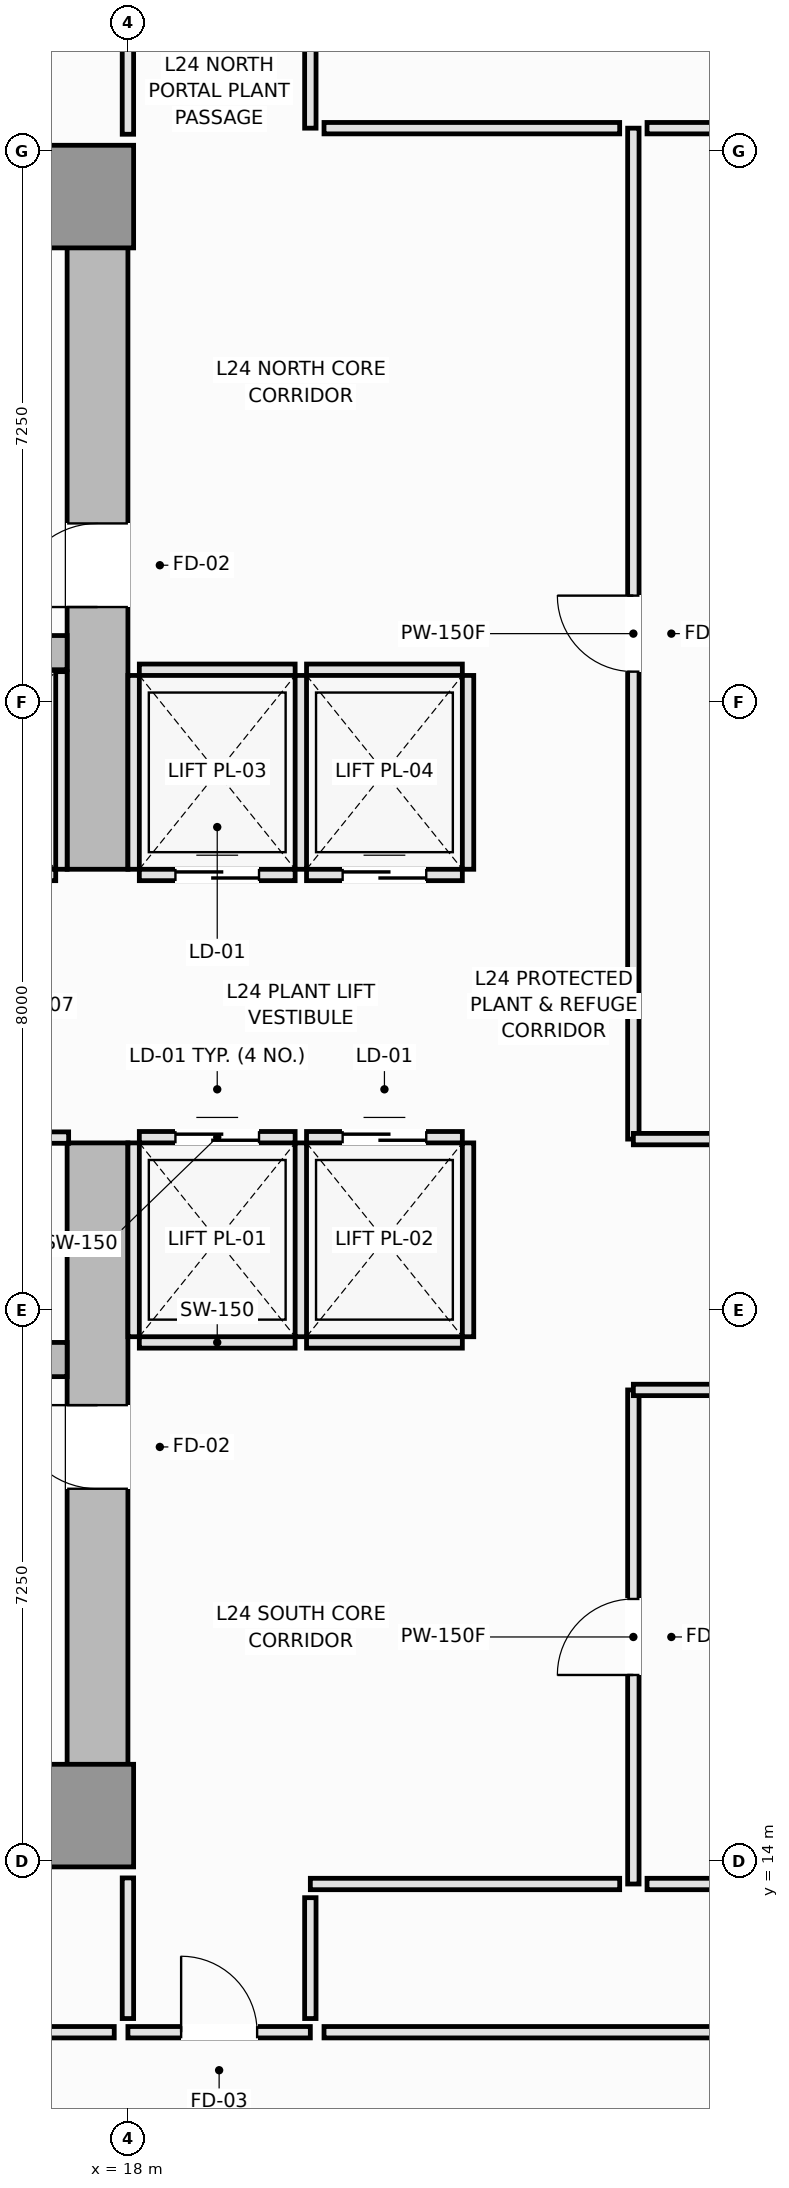
"""IFC4 building model, lengths in metres.
Left out: names, types, materials, properties, quantities, classifications, styles, units other than length and angle.
Written with IfcOpenShell. Run it as: python <this file> out.ifc"""

import sys

from ifc_helpers import new_model, si_unit, direction, frame, frame_2d, origin, origin_2d, place, context, subcontext, project, spatial, rectangle, extrude, element, fill, save


model = new_model("IFC4")
c1 = context("Model", 3, precision=1e-05, world=origin(), true_north=direction((0.0, 1.0)))
c2 = subcontext(c1, "Body", "Model", "MODEL_VIEW")
j1 = project(units=[si_unit("LENGTHUNIT", "METRE"), si_unit("PLANEANGLEUNIT", "RADIAN")], contexts=[c1])
p1 = place(None, origin())
s1 = spatial("IfcSite", under=j1, at=p1, CompositionType="ELEMENT")
p2 = place(p1, origin())
s2 = spatial("IfcBuilding", under=s1, at=p2, CompositionType="ELEMENT")
p3 = place(p2, frame((0.0, 0.0, 93.05)))
s3 = spatial("IfcBuildingStorey", under=s2, at=p3, CompositionType="ELEMENT", Elevation=93.05)
for number, where, z_axis, x_axis in (
    (1, (4.5, 14.4, 0.0), (0.0, 0.0, 1.0), (1.0, 0.0, 0.0)),
    (2, (4.5, 36.1, 0.0), (0.0, 0.0, 1.0), (1.0, 0.0, 0.0)),
):
    element("IfcWall", number, at=place(p3, frame(where, z_axis=z_axis, x_axis=x_axis)), inside=s3, PredefinedType="SHEAR", context=c2, shape_type="SweptSolid", body=[
        extrude(rectangle(XDim=13.5, YDim=0.8, at=frame_2d((6.75, 0.0))), origin(), (0.0, 0.0, 1.0), 4.8),
    ])
p4 = place(p3, frame((17.6, 14.8, 0.0), z_axis=(0.0, 0.0, 1.0), x_axis=(0.0, 1.0, 0.0)))
e3 = element("IfcWall", 3, at=p4, inside=s3, PredefinedType="SHEAR", context=c2, shape_type="SweptSolid", body=[
    extrude(rectangle(XDim=8.65, YDim=0.8, at=frame_2d((4.325, 0.0))), origin(), (0.0, 0.0, 1.0), 4.8),
])
p5 = place(p4, frame((4.1, 0.0, 0.0)))
e4 = element("IfcOpeningElement", 4, at=p5, cuts=e3, PredefinedType="OPENING", context=c2, shape_type="SweptSolid", body=[
    extrude(rectangle(XDim=1.1, YDim=2.15, at=frame_2d((0.55, 1.075))), frame((0.0, 0.41, 0.0), z_axis=(0.0, -1.0, 0.0), x_axis=(1.0, 0.0, 0.0)), (0.0, 0.0, 1.0), 0.82),
])
p6 = place(p3, frame((17.6, 27.05, 0.0), z_axis=(0.0, 0.0, 1.0), x_axis=(0.0, 1.0, 0.0)))
e5 = element("IfcWall", 5, at=p6, inside=s3, PredefinedType="SHEAR", context=c2, shape_type="SweptSolid", body=[
    extrude(rectangle(XDim=8.65, YDim=0.8, at=frame_2d((4.325, 0.0))), origin(), (0.0, 0.0, 1.0), 4.8),
])
p7 = place(p6, frame((3.45, 0.0, 0.0)))
e6 = element("IfcOpeningElement", 6, at=p7, cuts=e5, PredefinedType="OPENING", context=c2, shape_type="SweptSolid", body=[
    extrude(rectangle(XDim=1.1, YDim=2.15, at=frame_2d((0.55, 1.075))), frame((0.0, 0.41, 0.0), z_axis=(0.0, -1.0, 0.0), x_axis=(1.0, 0.0, 0.0)), (0.0, 0.0, 1.0), 0.82),
])
for number, where, z_axis, x_axis in (
    (7, (5.3, 20.6, 0.0), (0.0, 0.0, 1.0), (1.0, 0.0, 0.0)),
    (8, (5.3, 29.9, 0.0), (0.0, 0.0, 1.0), (1.0, 0.0, 0.0)),
):
    element("IfcWall", number, at=place(p3, frame(where, z_axis=z_axis, x_axis=x_axis)), inside=s3, PredefinedType="SHEAR", context=c2, shape_type="SweptSolid", body=[
        extrude(rectangle(XDim=11.9, YDim=0.45, at=frame_2d((5.95, 0.0))), origin(), (0.0, 0.0, 1.0), 4.8),
    ])
for number, where, z_axis, x_axis in (
    (9, (17.4, 14.6, 0.0), (0.0, 0.0, 1.0), (1.0, 0.0, 0.0)),
    (10, (17.4, 35.9, 0.0), (0.0, 0.0, 1.0), (1.0, 0.0, 0.0)),
):
    element("IfcColumn", number, at=place(p3, frame(where, z_axis=z_axis, x_axis=x_axis)), inside=s3, PredefinedType="PILASTER", context=c2, shape_type="SweptSolid", body=[
        extrude(rectangle(XDim=1.35, YDim=1.35, at=origin_2d()), origin(), (0.0, 0.0, 1.0), 4.8),
    ])
p8 = place(p3, frame((18.15, 20.825, 0.0), z_axis=(0.0, 0.0, 1.0), x_axis=(1.0, 0.0, 0.0)))
e11 = element("IfcWall", 11, at=p8, inside=s3, PredefinedType="PARTITIONING", context=c2, shape_type="SweptSolid", body=[
    extrude(rectangle(XDim=2.05, YDim=0.15, at=frame_2d((1.025, 0.0))), origin(), (0.0, 0.0, 1.0), 4.62),
])
p9 = place(p3, frame((18.15, 23.525, 0.0), z_axis=(0.0, 0.0, 1.0), x_axis=(1.0, 0.0, 0.0)))
e12 = element("IfcWall", 12, at=p9, inside=s3, PredefinedType="PARTITIONING", context=c2, shape_type="SweptSolid", body=[
    extrude(rectangle(XDim=2.05, YDim=0.15, at=frame_2d((1.025, 0.0))), origin(), (0.0, 0.0, 1.0), 4.62),
])
p10 = place(p9, frame((0.475, 0.0, 0.0)))
e13 = element("IfcOpeningElement", 13, at=p10, cuts=e12, PredefinedType="OPENING", context=c2, shape_type="SweptSolid", body=[
    extrude(rectangle(XDim=1.1, YDim=2.2, at=frame_2d((0.55, 1.1))), frame((0.0, 0.085, 0.0), z_axis=(0.0, -1.0, 0.0), x_axis=(1.0, 0.0, 0.0)), (0.0, 0.0, 1.0), 0.17),
])
for number, where, z_axis, x_axis in (
    (14, (18.075, 20.9, 0.0), (0.0, 0.0, 1.0), (0.0, 1.0, 0.0)),
    (15, (20.275, 20.9, 0.0), (0.0, 0.0, 1.0), (0.0, 1.0, 0.0)),
):
    element("IfcWall", number, at=place(p3, frame(where, z_axis=z_axis, x_axis=x_axis)), inside=s3, PredefinedType="PARTITIONING", context=c2, shape_type="SweptSolid", body=[
        extrude(rectangle(XDim=2.55, YDim=0.15, at=frame_2d((1.275, 0.0))), origin(), (0.0, 0.0, 1.0), 4.62),
    ])
p11 = place(p3, frame((20.35, 20.825, 0.0), z_axis=(0.0, 0.0, 1.0), x_axis=(1.0, 0.0, 0.0)))
e16 = element("IfcWall", 16, at=p11, inside=s3, PredefinedType="PARTITIONING", context=c2, shape_type="SweptSolid", body=[
    extrude(rectangle(XDim=2.05, YDim=0.15, at=frame_2d((1.025, 0.0))), origin(), (0.0, 0.0, 1.0), 4.62),
])
p12 = place(p3, frame((20.35, 23.525, 0.0), z_axis=(0.0, 0.0, 1.0), x_axis=(1.0, 0.0, 0.0)))
e17 = element("IfcWall", 17, at=p12, inside=s3, PredefinedType="PARTITIONING", context=c2, shape_type="SweptSolid", body=[
    extrude(rectangle(XDim=2.05, YDim=0.15, at=frame_2d((1.025, 0.0))), origin(), (0.0, 0.0, 1.0), 4.62),
])
p13 = place(p12, frame((0.475, 0.0, 0.0)))
e18 = element("IfcOpeningElement", 18, at=p13, cuts=e17, PredefinedType="OPENING", context=c2, shape_type="SweptSolid", body=[
    extrude(rectangle(XDim=1.1, YDim=2.2, at=frame_2d((0.55, 1.1))), frame((0.0, 0.085, 0.0), z_axis=(0.0, -1.0, 0.0), x_axis=(1.0, 0.0, 0.0)), (0.0, 0.0, 1.0), 0.17),
])
p14 = place(p3, frame((22.475, 20.9, 0.0), z_axis=(0.0, 0.0, 1.0), x_axis=(0.0, 1.0, 0.0)))
e19 = element("IfcWall", 19, at=p14, inside=s3, PredefinedType="PARTITIONING", context=c2, shape_type="SweptSolid", body=[
    extrude(rectangle(XDim=2.55, YDim=0.15, at=frame_2d((1.275, 0.0))), origin(), (0.0, 0.0, 1.0), 4.62),
])
p15 = place(p3, frame((18.15, 26.975, 0.0), z_axis=(0.0, 0.0, 1.0), x_axis=(1.0, 0.0, 0.0)))
e20 = element("IfcWall", 20, at=p15, inside=s3, PredefinedType="PARTITIONING", context=c2, shape_type="SweptSolid", body=[
    extrude(rectangle(XDim=2.05, YDim=0.15, at=frame_2d((1.025, 0.0))), origin(), (0.0, 0.0, 1.0), 4.62),
])
p16 = place(p15, frame((0.475, 0.0, 0.0)))
e21 = element("IfcOpeningElement", 21, at=p16, cuts=e20, PredefinedType="OPENING", context=c2, shape_type="SweptSolid", body=[
    extrude(rectangle(XDim=1.1, YDim=2.2, at=frame_2d((0.55, 1.1))), frame((0.0, 0.085, 0.0), z_axis=(0.0, -1.0, 0.0), x_axis=(1.0, 0.0, 0.0)), (0.0, 0.0, 1.0), 0.17),
])
p17 = place(p3, frame((18.15, 29.675, 0.0), z_axis=(0.0, 0.0, 1.0), x_axis=(1.0, 0.0, 0.0)))
e22 = element("IfcWall", 22, at=p17, inside=s3, PredefinedType="PARTITIONING", context=c2, shape_type="SweptSolid", body=[
    extrude(rectangle(XDim=2.05, YDim=0.15, at=frame_2d((1.025, 0.0))), origin(), (0.0, 0.0, 1.0), 4.62),
])
for number, where, z_axis, x_axis in (
    (23, (18.075, 27.05, 0.0), (0.0, 0.0, 1.0), (0.0, 1.0, 0.0)),
    (24, (20.275, 27.05, 0.0), (0.0, 0.0, 1.0), (0.0, 1.0, 0.0)),
):
    element("IfcWall", number, at=place(p3, frame(where, z_axis=z_axis, x_axis=x_axis)), inside=s3, PredefinedType="PARTITIONING", context=c2, shape_type="SweptSolid", body=[
        extrude(rectangle(XDim=2.55, YDim=0.15, at=frame_2d((1.275, 0.0))), origin(), (0.0, 0.0, 1.0), 4.62),
    ])
p18 = place(p3, frame((20.35, 26.975, 0.0), z_axis=(0.0, 0.0, 1.0), x_axis=(1.0, 0.0, 0.0)))
e25 = element("IfcWall", 25, at=p18, inside=s3, PredefinedType="PARTITIONING", context=c2, shape_type="SweptSolid", body=[
    extrude(rectangle(XDim=2.05, YDim=0.15, at=frame_2d((1.025, 0.0))), origin(), (0.0, 0.0, 1.0), 4.62),
])
p19 = place(p18, frame((0.475, 0.0, 0.0)))
e26 = element("IfcOpeningElement", 26, at=p19, cuts=e25, PredefinedType="OPENING", context=c2, shape_type="SweptSolid", body=[
    extrude(rectangle(XDim=1.1, YDim=2.2, at=frame_2d((0.55, 1.1))), frame((0.0, 0.085, 0.0), z_axis=(0.0, -1.0, 0.0), x_axis=(1.0, 0.0, 0.0)), (0.0, 0.0, 1.0), 0.17),
])
p20 = place(p3, frame((20.35, 29.675, 0.0), z_axis=(0.0, 0.0, 1.0), x_axis=(1.0, 0.0, 0.0)))
e27 = element("IfcWall", 27, at=p20, inside=s3, PredefinedType="PARTITIONING", context=c2, shape_type="SweptSolid", body=[
    extrude(rectangle(XDim=2.05, YDim=0.15, at=frame_2d((1.025, 0.0))), origin(), (0.0, 0.0, 1.0), 4.62),
])
p21 = place(p3, frame((22.475, 27.05, 0.0), z_axis=(0.0, 0.0, 1.0), x_axis=(0.0, 1.0, 0.0)))
e28 = element("IfcWall", 28, at=p21, inside=s3, PredefinedType="PARTITIONING", context=c2, shape_type="SweptSolid", body=[
    extrude(rectangle(XDim=2.55, YDim=0.15, at=frame_2d((1.275, 0.0))), origin(), (0.0, 0.0, 1.0), 4.62),
])
p22 = place(p3, frame((14.5, 26.975, 0.0), z_axis=(0.0, 0.0, 1.0), x_axis=(1.0, 0.0, 0.0)))
e29 = element("IfcWall", 29, at=p22, inside=s3, PredefinedType="PARTITIONING", context=c2, shape_type="SweptSolid", body=[
    extrude(rectangle(XDim=2.55, YDim=0.15, at=frame_2d((1.275, 0.0))), origin(), (0.0, 0.0, 1.0), 4.62),
])
p23 = place(p22, frame((0.625, 0.0, 0.0)))
e30 = element("IfcOpeningElement", 30, at=p23, cuts=e29, PredefinedType="OPENING", context=c2, shape_type="SweptSolid", body=[
    extrude(rectangle(XDim=1.3, YDim=2.2, at=frame_2d((0.65, 1.1))), frame((0.0, 0.085, 0.0), z_axis=(0.0, -1.0, 0.0), x_axis=(1.0, 0.0, 0.0)), (0.0, 0.0, 1.0), 0.17),
])
p24 = place(p3, frame((17.125, 27.05, 0.0), z_axis=(0.0, 0.0, 1.0), x_axis=(0.0, 1.0, 0.0)))
e31 = element("IfcWall", 31, at=p24, inside=s3, PredefinedType="PARTITIONING", context=c2, shape_type="SweptSolid", body=[
    extrude(rectangle(XDim=2.6, YDim=0.15, at=frame_2d((1.3, 0.0))), origin(), (0.0, 0.0, 1.0), 4.62),
])
p25 = place(p3, frame((14.33, 23.52, 0.0), z_axis=(0.0, 0.0, 1.0), x_axis=(1.0, 0.0, 0.0)))
e32 = element("IfcWall", 32, at=p25, inside=s3, PredefinedType="PARTITIONING", context=c2, shape_type="SweptSolid", body=[
    extrude(rectangle(XDim=2.89, YDim=0.15, at=frame_2d((1.445, 0.0))), origin(), (0.0, 0.0, 1.0), 4.62),
])
p26 = place(p25, frame((0.28, 0.0, 0.0)))
e33 = element("IfcOpeningElement", 33, at=p26, cuts=e32, PredefinedType="OPENING", context=c2, shape_type="SweptSolid", body=[
    extrude(rectangle(XDim=0.9, YDim=2.1, at=frame_2d((0.45, 1.05))), frame((0.0, 0.085, 0.0), z_axis=(0.0, -1.0, 0.0), x_axis=(1.0, 0.0, 0.0)), (0.0, 0.0, 1.0), 0.17),
])
p27 = place(p25, frame((1.71, 0.0, 0.0)))
e34 = element("IfcOpeningElement", 34, at=p27, cuts=e32, PredefinedType="OPENING", context=c2, shape_type="SweptSolid", body=[
    extrude(rectangle(XDim=0.9, YDim=2.1, at=frame_2d((0.45, 1.05))), frame((0.0, 0.085, 0.0), z_axis=(0.0, -1.0, 0.0), x_axis=(1.0, 0.0, 0.0)), (0.0, 0.0, 1.0), 0.17),
])
p28 = place(p3, frame((24.65, 13.7, 0.0), z_axis=(0.0, 0.0, 1.0), x_axis=(0.0, 1.0, 0.0)))
e35 = element("IfcWall", 35, at=p28, inside=s3, PredefinedType="PARTITIONING", context=c2, shape_type="SweptSolid", body=[
    extrude(rectangle(XDim=6.5, YDim=0.15, at=frame_2d((3.25, 0.0))), origin(), (0.0, 0.0, 1.0), 4.62),
])
p29 = place(p28, frame((2.75, 0.0, 0.0)))
e36 = element("IfcOpeningElement", 36, at=p29, cuts=e35, PredefinedType="OPENING", context=c2, shape_type="SweptSolid", body=[
    extrude(rectangle(XDim=1.0, YDim=2.15, at=frame_2d((0.5, 1.075))), frame((0.0, 0.085, 0.0), z_axis=(0.0, -1.0, 0.0), x_axis=(1.0, 0.0, 0.0)), (0.0, 0.0, 1.0), 0.17),
])
p30 = place(p3, frame((24.65, 23.5, 0.0), z_axis=(0.0, 0.0, 1.0), x_axis=(0.0, 1.0, 0.0)))
e37 = element("IfcWall", 37, at=p30, inside=s3, PredefinedType="PARTITIONING", context=c2, shape_type="SweptSolid", body=[
    extrude(rectangle(XDim=13.3, YDim=0.15, at=frame_2d((6.65, 0.0))), origin(), (0.0, 0.0, 1.0), 4.62),
])
p31 = place(p30, frame((6.15, 0.0, 0.0)))
e38 = element("IfcOpeningElement", 38, at=p31, cuts=e37, PredefinedType="OPENING", context=c2, shape_type="SweptSolid", body=[
    extrude(rectangle(XDim=1.0, YDim=2.15, at=frame_2d((0.5, 1.075))), frame((0.0, 0.085, 0.0), z_axis=(0.0, -1.0, 0.0), x_axis=(1.0, 0.0, 0.0)), (0.0, 0.0, 1.0), 0.17),
])
p32 = place(p3, frame((18.0, 11.75, 0.0), z_axis=(0.0, 0.0, 1.0), x_axis=(1.0, 0.0, 0.0)))
e39 = element("IfcWall", 39, at=p32, inside=s3, PredefinedType="PARTITIONING", context=c2, shape_type="SweptSolid", body=[
    extrude(rectangle(XDim=2.4, YDim=0.15, at=frame_2d((1.2, 0.0))), origin(), (0.0, 0.0, 1.0), 4.62),
])
p33 = place(p32, frame((0.7, 0.0, 0.0)))
e40 = element("IfcOpeningElement", 40, at=p33, cuts=e39, PredefinedType="OPENING", context=c2, shape_type="SweptSolid", body=[
    extrude(rectangle(XDim=1.0, YDim=2.15, at=frame_2d((0.5, 1.075))), frame((0.0, 0.085, 0.0), z_axis=(0.0, -1.0, 0.0), x_axis=(1.0, 0.0, 0.0)), (0.0, 0.0, 1.0), 0.17),
])
p34 = place(p3, frame((24.65, 20.2, 0.0), z_axis=(0.0, 0.0, 1.0), x_axis=(1.0, 0.0, 0.0)))
e41 = element("IfcWall", 41, at=p34, inside=s3, PredefinedType="PARTITIONING", context=c2, shape_type="SweptSolid", body=[
    extrude(rectangle(XDim=9.95, YDim=0.15, at=frame_2d((4.975, 0.0))), origin(), (0.0, 0.0, 1.0), 4.62),
])
p35 = place(p3, frame((24.65, 23.5, 0.0), z_axis=(0.0, 0.0, 1.0), x_axis=(1.0, 0.0, 0.0)))
e42 = element("IfcWall", 42, at=p35, inside=s3, PredefinedType="PARTITIONING", context=c2, shape_type="SweptSolid", body=[
    extrude(rectangle(XDim=12.55, YDim=0.15, at=frame_2d((6.275, 0.0))), origin(), (0.0, 0.0, 1.0), 4.62),
])
p36 = place(p3, frame((18.0, 36.72, 0.0), z_axis=(0.0, 0.0, 1.0), x_axis=(0.0, 1.0, 0.0)))
e43 = element("IfcWall", 43, at=p36, inside=s3, PredefinedType="PARTITIONING", context=c2, shape_type="SweptSolid", body=[
    extrude(rectangle(XDim=1.85, YDim=0.15, at=frame_2d((0.925, 0.0))), origin(), (0.0, 0.0, 1.0), 4.62),
])
p37 = place(p3, frame((20.4, 38.57, 0.0), z_axis=(0.0, 0.0, 1.0), x_axis=(0.0, -1.0, 0.0)))
e44 = element("IfcWall", 44, at=p37, inside=s3, PredefinedType="PARTITIONING", context=c2, shape_type="SweptSolid", body=[
    extrude(rectangle(XDim=1.77, YDim=0.15, at=frame_2d((0.885, 0.0))), origin(), (0.0, 0.0, 1.0), 4.62),
])
p38 = place(p3, frame((20.58, 36.8, 0.0), z_axis=(0.0, 0.0, 1.0), x_axis=(1.0, 0.0, 0.0)))
e45 = element("IfcWall", 45, at=p38, inside=s3, PredefinedType="PARTITIONING", context=c2, shape_type="SweptSolid", body=[
    extrude(rectangle(XDim=3.89, YDim=0.15, at=frame_2d((1.945, 0.0))), origin(), (0.0, 0.0, 1.0), 4.62),
])
p39 = place(p3, frame((24.83, 36.8, 0.0), z_axis=(0.0, 0.0, 1.0), x_axis=(1.0, 0.0, 0.0)))
e46 = element("IfcWall", 46, at=p39, inside=s3, PredefinedType="PARTITIONING", context=c2, shape_type="SweptSolid", body=[
    extrude(rectangle(XDim=12.37, YDim=0.15, at=frame_2d((6.185, 0.0))), origin(), (0.0, 0.0, 1.0), 4.62),
])
p40 = place(p3, frame((34.42, 13.7, 0.0), z_axis=(0.0, 0.0, 1.0), x_axis=(-1.0, 0.0, 0.0)))
e47 = element("IfcWall", 47, at=p40, inside=s3, PredefinedType="PARTITIONING", context=c2, shape_type="SweptSolid", body=[
    extrude(rectangle(XDim=9.59, YDim=0.15, at=frame_2d((4.795, 0.0))), origin(), (0.0, 0.0, 1.0), 4.62),
])
p41 = place(p3, frame((24.47, 13.7, 0.0), z_axis=(0.0, 0.0, 1.0), x_axis=(-1.0, 0.0, 0.0)))
e48 = element("IfcWall", 48, at=p41, inside=s3, PredefinedType="PARTITIONING", context=c2, shape_type="SweptSolid", body=[
    extrude(rectangle(XDim=4.07, YDim=0.15, at=frame_2d((2.035, 0.0))), origin(), (0.0, 0.0, 1.0), 4.62),
])
p42 = place(p3, frame((20.4, 13.52, 0.0), z_axis=(0.0, 0.0, 1.0), x_axis=(0.0, -1.0, 0.0)))
e49 = element("IfcWall", 49, at=p42, inside=s3, PredefinedType="PARTITIONING", context=c2, shape_type="SweptSolid", body=[
    extrude(rectangle(XDim=1.59, YDim=0.15, at=frame_2d((0.795, 0.0))), origin(), (0.0, 0.0, 1.0), 4.62),
])
p43 = place(p3, frame((20.58, 11.75, 0.0), z_axis=(0.0, 0.0, 1.0), x_axis=(1.0, 0.0, 0.0)))
e50 = element("IfcWall", 50, at=p43, inside=s3, PredefinedType="PARTITIONING", context=c2, shape_type="SweptSolid", body=[
    extrude(rectangle(XDim=16.62, YDim=0.15, at=frame_2d((8.31, 0.0))), origin(), (0.0, 0.0, 1.0), 4.62),
])
p44 = place(p3, frame((10.68, 11.75, 0.0), z_axis=(0.0, 0.0, 1.0), x_axis=(1.0, 0.0, 0.0)))
e51 = element("IfcWall", 51, at=p44, inside=s3, PredefinedType="PARTITIONING", context=c2, shape_type="SweptSolid", body=[
    extrude(rectangle(XDim=7.14, YDim=0.15, at=frame_2d((3.57, 0.0))), origin(), (0.0, 0.0, 1.0), 4.62),
])
p45 = place(p3, frame((18.0, 11.93, 0.0), z_axis=(0.0, 0.0, 1.0), x_axis=(0.0, 1.0, 0.0)))
e52 = element("IfcWall", 52, at=p45, inside=s3, PredefinedType="PARTITIONING", context=c2, shape_type="SweptSolid", body=[
    extrude(rectangle(XDim=1.85, YDim=0.15, at=frame_2d((0.925, 0.0))), origin(), (0.0, 0.0, 1.0), 4.62),
])
p46 = place(p10, origin())
e53 = element("IfcDoor", 53, at=p46, inside=s3, OperationType="DOUBLE_DOOR_SLIDING", PredefinedType="DOOR", context=c2, shape_type="SweptSolid", body=[
    extrude(rectangle(XDim=1.1, YDim=2.2, at=frame_2d((0.55, 1.1))), frame((0.0, 0.025, 0.0), z_axis=(0.0, -1.0, 0.0), x_axis=(1.0, 0.0, 0.0)), (0.0, 0.0, 1.0), 0.05),
])
fill(e13, e53)
p47 = place(p13, origin())
e54 = element("IfcDoor", 54, at=p47, inside=s3, OperationType="DOUBLE_DOOR_SLIDING", PredefinedType="DOOR", context=c2, shape_type="SweptSolid", body=[
    extrude(rectangle(XDim=1.1, YDim=2.2, at=frame_2d((0.55, 1.1))), frame((0.0, 0.025, 0.0), z_axis=(0.0, -1.0, 0.0), x_axis=(1.0, 0.0, 0.0)), (0.0, 0.0, 1.0), 0.05),
])
fill(e18, e54)
p48 = place(p16, origin())
e55 = element("IfcDoor", 55, at=p48, inside=s3, OperationType="DOUBLE_DOOR_SLIDING", PredefinedType="DOOR", context=c2, shape_type="SweptSolid", body=[
    extrude(rectangle(XDim=1.1, YDim=2.2, at=frame_2d((0.55, 1.1))), frame((0.0, 0.025, 0.0), z_axis=(0.0, -1.0, 0.0), x_axis=(1.0, 0.0, 0.0)), (0.0, 0.0, 1.0), 0.05),
])
fill(e21, e55)
p49 = place(p19, origin())
e56 = element("IfcDoor", 56, at=p49, inside=s3, OperationType="DOUBLE_DOOR_SLIDING", PredefinedType="DOOR", context=c2, shape_type="SweptSolid", body=[
    extrude(rectangle(XDim=1.1, YDim=2.2, at=frame_2d((0.55, 1.1))), frame((0.0, 0.025, 0.0), z_axis=(0.0, -1.0, 0.0), x_axis=(1.0, 0.0, 0.0)), (0.0, 0.0, 1.0), 0.05),
])
fill(e26, e56)
p50 = place(p5, origin())
e57 = element("IfcDoor", 57, at=p50, inside=s3, OperationType="SINGLE_SWING_RIGHT", PredefinedType="DOOR", context=c2, shape_type="SweptSolid", body=[
    extrude(rectangle(XDim=1.1, YDim=2.15, at=frame_2d((0.55, 1.075))), frame((0.0, 0.025, 0.0), z_axis=(0.0, -1.0, 0.0), x_axis=(1.0, 0.0, 0.0)), (0.0, 0.0, 1.0), 0.05),
])
fill(e4, e57)
p51 = place(p7, origin())
e58 = element("IfcDoor", 58, at=p51, inside=s3, OperationType="SINGLE_SWING_LEFT", PredefinedType="DOOR", context=c2, shape_type="SweptSolid", body=[
    extrude(rectangle(XDim=1.1, YDim=2.15, at=frame_2d((0.55, 1.075))), frame((0.0, 0.025, 0.0), z_axis=(0.0, -1.0, 0.0), x_axis=(1.0, 0.0, 0.0)), (0.0, 0.0, 1.0), 0.05),
])
fill(e6, e58)
p52 = place(p29, origin())
e59 = element("IfcDoor", 59, at=p52, inside=s3, OperationType="SINGLE_SWING_LEFT", PredefinedType="DOOR", context=c2, shape_type="SweptSolid", body=[
    extrude(rectangle(XDim=1.0, YDim=2.15, at=frame_2d((0.5, 1.075))), frame((0.0, 0.025, 0.0), z_axis=(0.0, -1.0, 0.0), x_axis=(1.0, 0.0, 0.0)), (0.0, 0.0, 1.0), 0.05),
])
fill(e36, e59)
p53 = place(p31, origin())
e60 = element("IfcDoor", 60, at=p53, inside=s3, OperationType="SINGLE_SWING_RIGHT", PredefinedType="DOOR", context=c2, shape_type="SweptSolid", body=[
    extrude(rectangle(XDim=1.0, YDim=2.15, at=frame_2d((0.5, 1.075))), frame((0.0, 0.025, 0.0), z_axis=(0.0, -1.0, 0.0), x_axis=(1.0, 0.0, 0.0)), (0.0, 0.0, 1.0), 0.05),
])
fill(e38, e60)
p54 = place(p33, origin())
e61 = element("IfcDoor", 61, at=p54, inside=s3, OperationType="SINGLE_SWING_LEFT", PredefinedType="DOOR", context=c2, shape_type="SweptSolid", body=[
    extrude(rectangle(XDim=1.0, YDim=2.15, at=frame_2d((0.5, 1.075))), frame((0.0, 0.025, 0.0), z_axis=(0.0, -1.0, 0.0), x_axis=(1.0, 0.0, 0.0)), (0.0, 0.0, 1.0), 0.05),
])
fill(e40, e61)
save(model, sys.argv[1])
